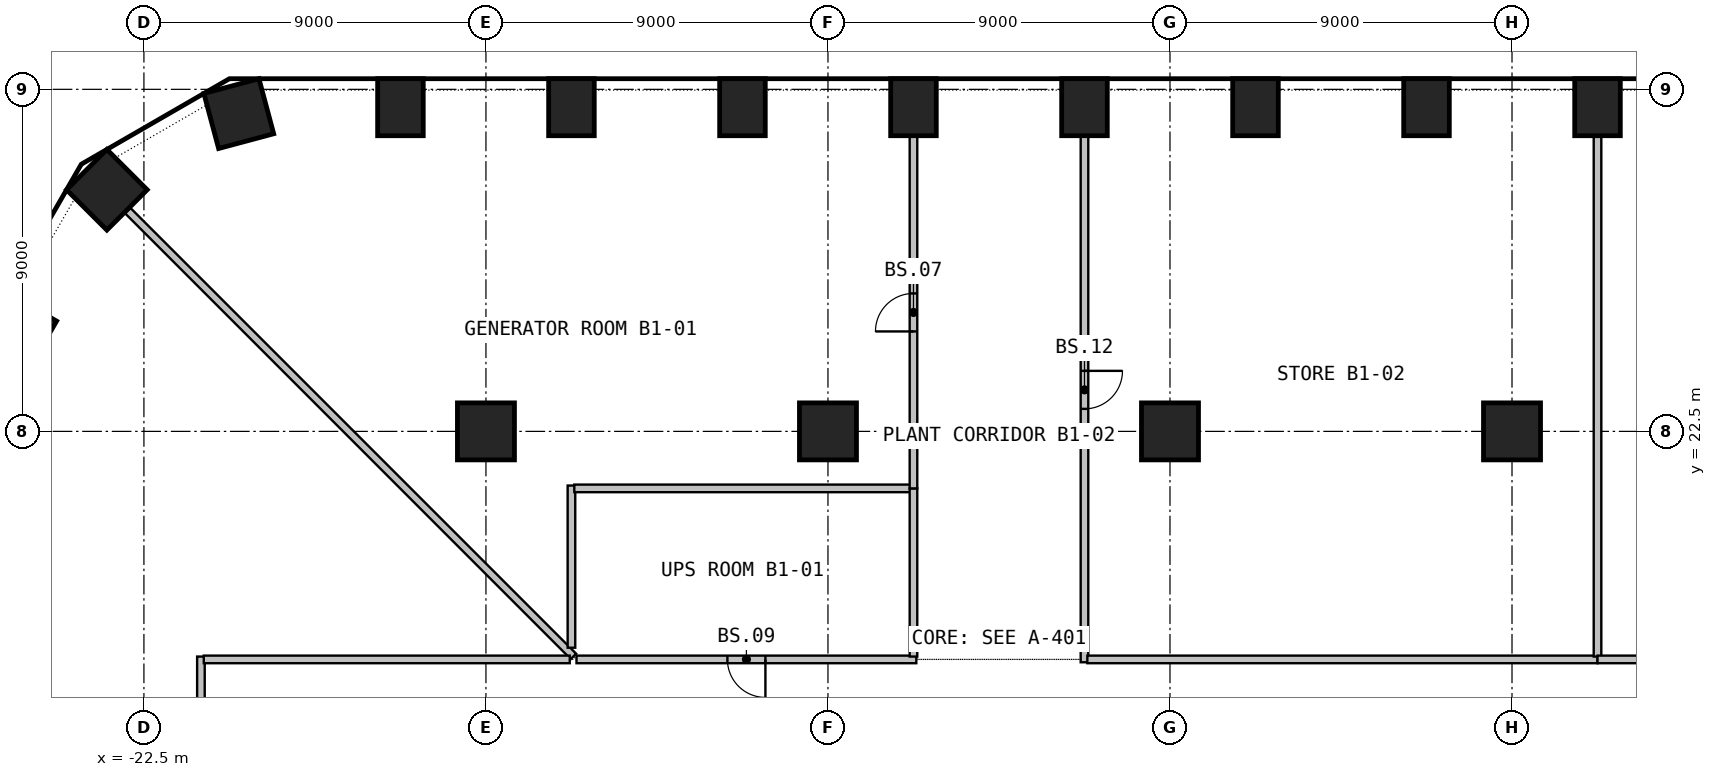
"""IFC4 building model, lengths in metres.
Left out: names, types, materials, properties, quantities, classifications, styles, units other than length and angle.
Written with IfcOpenShell. Run it as: python <this file> out.ifc"""

import sys

from ifc_helpers import new_model, si_unit, direction, frame, frame_2d, origin, origin_2d, place, context, subcontext, project, spatial, rectangle, circle, extrude, element, fill, save


model = new_model("IFC4")
c1 = context("Model", 3, precision=1e-05, world=origin(), true_north=direction((0.0, 1.0)))
c2 = subcontext(c1, "Body", "Model", "MODEL_VIEW")
j1 = project(units=[si_unit("LENGTHUNIT", "METRE"), si_unit("PLANEANGLEUNIT", "RADIAN")], contexts=[c1])
p1 = place(None, origin())
s1 = spatial("IfcSite", under=j1, at=p1, CompositionType="ELEMENT")
p2 = place(p1, origin())
s2 = spatial("IfcBuilding", under=s1, at=p2, CompositionType="ELEMENT")
p3 = place(p2, frame((0.0, 0.0, -5.0)))
s3 = spatial("IfcBuildingStorey", under=s2, at=p3, CompositionType="ELEMENT", Elevation=-5.0)
for number, where, z_axis, x_axis in (
    (1, (15.75, 31.03, 0.0), (0.0, 0.0, 1.0), (-1.0, 0.0, 0.0)),
    (2, (11.25, 31.03, 0.0), (0.0, 0.0, 1.0), (-1.0, 0.0, 0.0)),
    (3, (6.75, 31.03, 0.0), (0.0, 0.0, 1.0), (-1.0, 0.0, 0.0)),
    (4, (2.25, 31.03, 0.0), (0.0, 0.0, 1.0), (-1.0, 0.0, 0.0)),
    (5, (-2.25, 31.03, 0.0), (0.0, 0.0, 1.0), (-1.0, 0.0, 0.0)),
    (6, (-6.75, 31.03, 0.0), (0.0, 0.0, 1.0), (-1.0, 0.0, 0.0)),
    (7, (-11.25, 31.03, 0.0), (0.0, 0.0, 1.0), (-1.0, 0.0, 0.0)),
    (8, (-15.75, 31.03, 0.0), (0.0, 0.0, 1.0), (-1.0, 0.0, 0.0)),
):
    element("IfcColumn", number, at=place(p3, frame(where, z_axis=z_axis, x_axis=x_axis)), inside=s3, PredefinedType="COLUMN", context=c2, shape_type="SweptSolid", body=[
        extrude(rectangle(XDim=1.2, YDim=1.5, at=origin_2d()), origin(), (0.0, 0.0, 1.0), 4.55),
    ])
for number, where, z_axis, x_axis in (
    (9, (-20.004, 30.861, 0.0), (0.0, 0.0, 1.0), (-0.966, -0.259, 0.0)),
    (10, (-23.475, 28.857, 0.0), (0.0, 0.0, 1.0), (-0.707, -0.707, 0.0)),
):
    element("IfcColumn", number, at=place(p3, frame(where, z_axis=z_axis, x_axis=x_axis)), inside=s3, PredefinedType="COLUMN", context=c2, shape_type="SweptSolid", body=[
        extrude(rectangle(XDim=1.5, YDim=1.5, at=origin_2d()), origin(), (0.0, 0.0, 1.0), 4.55),
    ])
p4 = place(p3, frame((-25.748, 25.258, 0.0), z_axis=(0.0, 0.0, 1.0), x_axis=(-0.5, -0.866025403784, 0.0)))
e11 = element("IfcColumn", 11, at=p4, inside=s3, PredefinedType="COLUMN", context=c2, shape_type="SweptSolid", body=[
    extrude(rectangle(XDim=1.2, YDim=1.5, at=origin_2d()), origin(), (0.0, 0.0, 1.0), 4.55),
])
for number, where, z_axis, x_axis in (
    (12, (-13.5, 22.5, 0.0), (0.0, 0.0, 1.0), (1.0, 0.0, 0.0)),
    (13, (-4.5, 22.5, 0.0), (0.0, 0.0, 1.0), (1.0, 0.0, 0.0)),
    (14, (4.5, 22.5, 0.0), (0.0, 0.0, 1.0), (1.0, 0.0, 0.0)),
    (15, (13.5, 22.5, 0.0), (0.0, 0.0, 1.0), (1.0, 0.0, 0.0)),
):
    element("IfcColumn", number, at=place(p3, frame(where, z_axis=z_axis, x_axis=x_axis)), inside=s3, PredefinedType="COLUMN", context=c2, shape_type="SweptSolid", body=[
        extrude(circle(Radius=0.75, at=origin_2d()), origin(), (0.0, 0.0, 1.0), 4.55),
    ])
p5 = place(p3, frame((-22.93, 28.313, 0.0), z_axis=(0.0, 0.0, 1.0), x_axis=(0.707114137878, -0.707099424419, 0.0)))
e16 = element("IfcWall", 16, at=p5, inside=s3, PredefinedType="PARTITIONING", context=c2, shape_type="SweptSolid", body=[
    extrude(rectangle(XDim=16.593, YDim=0.2, at=frame_2d((8.296, 0.0))), origin(), (0.0, 0.0, 1.0), 4.55),
])
p6 = place(p3, frame((-21.0, 16.575, 0.0), z_axis=(0.0, 0.0, 1.0), x_axis=(0.0, -1.0, 0.0)))
e17 = element("IfcWall", 17, at=p6, inside=s3, PredefinedType="PARTITIONING", context=c2, shape_type="SweptSolid", body=[
    extrude(rectangle(XDim=14.25, YDim=0.2, at=frame_2d((7.125, 0.0))), origin(), (0.0, 0.0, 1.0), 4.55),
])
p7 = place(p6, frame((6.625, 0.0, 0.0)))
e18 = element("IfcOpeningElement", 18, at=p7, cuts=e17, PredefinedType="OPENING", context=c2, shape_type="SweptSolid", body=[
    extrude(rectangle(XDim=1.0, YDim=2.1, at=frame_2d((0.5, 1.05))), frame((0.0, 0.11, 0.0), z_axis=(0.0, -1.0, 0.0), x_axis=(1.0, 0.0, 0.0)), (0.0, 0.0, 1.0), 0.22),
])
p8 = place(p3, frame((-11.295, 16.5, 0.0), z_axis=(0.0, 0.0, 1.0), x_axis=(-1.0, 0.0, 0.0)))
e19 = element("IfcWall", 19, at=p8, inside=s3, PredefinedType="PARTITIONING", context=c2, shape_type="SweptSolid", body=[
    extrude(rectangle(XDim=9.63, YDim=0.2, at=frame_2d((4.815, 0.0))), origin(), (0.0, 0.0, 1.0), 4.55),
])
p9 = place(p3, frame((-11.25, 21.075, 0.0), z_axis=(0.0, 0.0, 1.0), x_axis=(0.0, -1.0, 0.0)))
e20 = element("IfcWall", 20, at=p9, inside=s3, PredefinedType="PARTITIONING", context=c2, shape_type="SweptSolid", body=[
    extrude(rectangle(XDim=4.267, YDim=0.2, at=frame_2d((2.133, 0.0))), origin(), (0.0, 0.0, 1.0), 4.55),
])
p10 = place(p3, frame((-2.325, 21.0, 0.0), z_axis=(0.0, 0.0, 1.0), x_axis=(-1.0, 0.0, 0.0)))
e21 = element("IfcWall", 21, at=p10, inside=s3, PredefinedType="PARTITIONING", context=c2, shape_type="SweptSolid", body=[
    extrude(rectangle(XDim=8.85, YDim=0.2, at=frame_2d((4.425, 0.0))), origin(), (0.0, 0.0, 1.0), 4.55),
])
p11 = place(p3, frame((-2.175, 16.5, 0.0), z_axis=(0.0, 0.0, 1.0), x_axis=(-1.0, 0.0, 0.0)))
e22 = element("IfcWall", 22, at=p11, inside=s3, PredefinedType="PARTITIONING", context=c2, shape_type="SweptSolid", body=[
    extrude(rectangle(XDim=8.942, YDim=0.2, at=frame_2d((4.471, 0.0))), origin(), (0.0, 0.0, 1.0), 4.55),
])
p12 = place(p11, frame((3.971, 0.0, 0.0)))
e23 = element("IfcOpeningElement", 23, at=p12, cuts=e22, PredefinedType="OPENING", context=c2, shape_type="SweptSolid", body=[
    extrude(rectangle(XDim=1.0, YDim=2.1, at=frame_2d((0.5, 1.05))), frame((0.0, 0.11, 0.0), z_axis=(0.0, -1.0, 0.0), x_axis=(1.0, 0.0, 0.0)), (0.0, 0.0, 1.0), 0.22),
])
p13 = place(p3, frame((-2.25, 16.575, 0.0), z_axis=(0.0, 0.0, 1.0), x_axis=(0.0, 1.0, 0.0)))
e24 = element("IfcWall", 24, at=p13, inside=s3, PredefinedType="PARTITIONING", context=c2, shape_type="SweptSolid", body=[
    extrude(rectangle(XDim=4.425, YDim=0.2, at=frame_2d((2.212, 0.0))), origin(), (0.0, 0.0, 1.0), 4.55),
])
p14 = place(p3, frame((-2.25, 21.0, 0.0), z_axis=(0.0, 0.0, 1.0), x_axis=(0.0, 1.0, 0.0)))
e25 = element("IfcWall", 25, at=p14, inside=s3, PredefinedType="PARTITIONING", context=c2, shape_type="SweptSolid", body=[
    extrude(rectangle(XDim=9.26, YDim=0.2, at=frame_2d((4.63, 0.0))), origin(), (0.0, 0.0, 1.0), 4.55),
])
p15 = place(p14, frame((4.13, 0.0, 0.0)))
e26 = element("IfcOpeningElement", 26, at=p15, cuts=e25, PredefinedType="OPENING", context=c2, shape_type="SweptSolid", body=[
    extrude(rectangle(XDim=1.0, YDim=2.1, at=frame_2d((0.5, 1.05))), frame((0.0, 0.11, 0.0), z_axis=(0.0, -1.0, 0.0), x_axis=(1.0, 0.0, 0.0)), (0.0, 0.0, 1.0), 0.22),
])
p16 = place(p3, frame((2.25, 30.26, 0.0), z_axis=(0.0, 0.0, 1.0), x_axis=(0.0, -1.0, 0.0)))
e27 = element("IfcWall", 27, at=p16, inside=s3, PredefinedType="PARTITIONING", context=c2, shape_type="SweptSolid", body=[
    extrude(rectangle(XDim=13.835, YDim=0.2, at=frame_2d((6.917, 0.0))), origin(), (0.0, 0.0, 1.0), 4.55),
])
p17 = place(p16, frame((6.167, 0.0, 0.0)))
e28 = element("IfcOpeningElement", 28, at=p17, cuts=e27, PredefinedType="OPENING", context=c2, shape_type="SweptSolid", body=[
    extrude(rectangle(XDim=1.0, YDim=2.1, at=frame_2d((0.5, 1.05))), frame((0.0, 0.11, 0.0), z_axis=(0.0, -1.0, 0.0), x_axis=(1.0, 0.0, 0.0)), (0.0, 0.0, 1.0), 0.22),
])
p18 = place(p3, frame((15.75, 16.5, 0.0), z_axis=(0.0, 0.0, 1.0), x_axis=(-1.0, 0.0, 0.0)))
e29 = element("IfcWall", 29, at=p18, inside=s3, PredefinedType="PARTITIONING", context=c2, shape_type="SweptSolid", body=[
    extrude(rectangle(XDim=13.425, YDim=0.2, at=frame_2d((6.712, 0.0))), origin(), (0.0, 0.0, 1.0), 4.55),
])
p19 = place(p3, frame((15.75, 30.26, 0.0), z_axis=(0.0, 0.0, 1.0), x_axis=(0.0, -1.0, 0.0)))
e30 = element("IfcWall", 30, at=p19, inside=s3, PredefinedType="PARTITIONING", context=c2, shape_type="SweptSolid", body=[
    extrude(rectangle(XDim=13.685, YDim=0.2, at=frame_2d((6.842, 0.0))), origin(), (0.0, 0.0, 1.0), 4.55),
])
p20 = place(p3, frame((21.075, 16.5, 0.0), z_axis=(0.0, 0.0, 1.0), x_axis=(-1.0, 0.0, 0.0)))
e31 = element("IfcWall", 31, at=p20, inside=s3, PredefinedType="PARTITIONING", context=c2, shape_type="SweptSolid", body=[
    extrude(rectangle(XDim=5.325, YDim=0.2, at=frame_2d((2.663, 0.0))), origin(), (0.0, 0.0, 1.0), 4.55),
])
p21 = place(p15, origin())
e32 = element("IfcDoor", 32, at=p21, inside=s3, OperationType="SINGLE_SWING_RIGHT", PredefinedType="DOOR", context=c2, shape_type="SweptSolid", body=[
    extrude(rectangle(XDim=1.0, YDim=2.1, at=frame_2d((0.5, 1.05))), frame((0.0, 0.025, 0.0), z_axis=(0.0, -1.0, 0.0), x_axis=(1.0, 0.0, 0.0)), (0.0, 0.0, 1.0), 0.05),
])
fill(e26, e32)
p22 = place(p12, origin())
e33 = element("IfcDoor", 33, at=p22, inside=s3, OperationType="SINGLE_SWING_RIGHT", PredefinedType="DOOR", context=c2, shape_type="SweptSolid", body=[
    extrude(rectangle(XDim=1.0, YDim=2.1, at=frame_2d((0.5, 1.05))), frame((0.0, 0.025, 0.0), z_axis=(0.0, -1.0, 0.0), x_axis=(1.0, 0.0, 0.0)), (0.0, 0.0, 1.0), 0.05),
])
fill(e23, e33)
p23 = place(p17, origin())
e34 = element("IfcDoor", 34, at=p23, inside=s3, OperationType="SINGLE_SWING_RIGHT", PredefinedType="DOOR", context=c2, shape_type="SweptSolid", body=[
    extrude(rectangle(XDim=1.0, YDim=2.1, at=frame_2d((0.5, 1.05))), frame((0.0, 0.025, 0.0), z_axis=(0.0, -1.0, 0.0), x_axis=(1.0, 0.0, 0.0)), (0.0, 0.0, 1.0), 0.05),
])
fill(e28, e34)
save(model, sys.argv[1])
